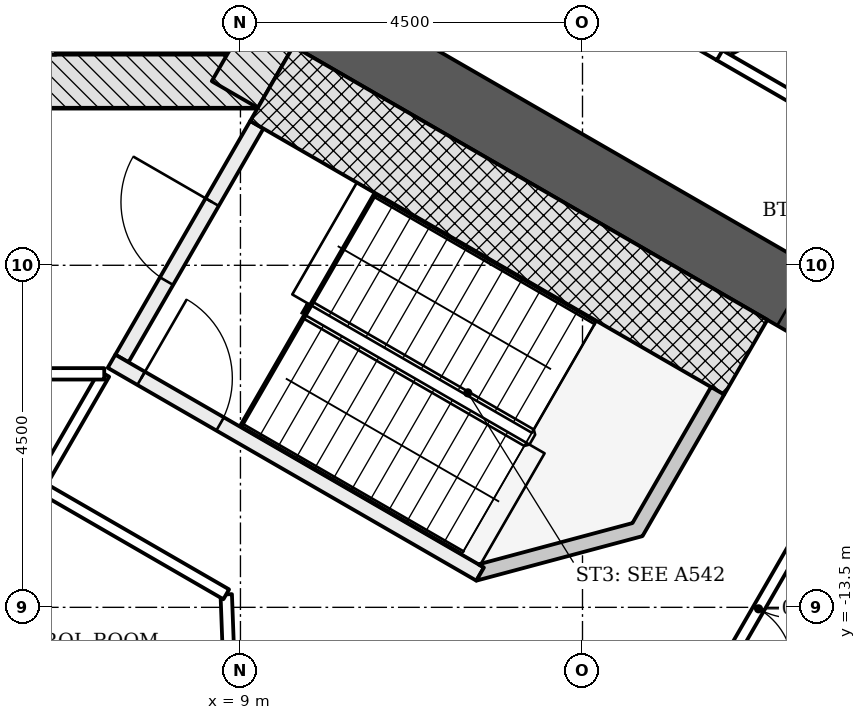
"""IFC4 building model, lengths in metres.
Left out: names, types, materials, properties, quantities, classifications, styles, units other than length and angle.
Written with IfcOpenShell. Run it as: python <this file> out.ifc"""

import sys

from ifc_helpers import new_model, si_unit, direction, frame, frame_2d, origin, place, context, subcontext, project, spatial, polyline, rectangle, outline, extrude, element, fill, save


model = new_model("IFC4")
c1 = context("Model", 3, precision=1e-05, world=origin(), true_north=direction((0.0, 1.0)))
c2 = subcontext(c1, "Body", "Model", "MODEL_VIEW")
j1 = project(units=[si_unit("LENGTHUNIT", "METRE"), si_unit("PLANEANGLEUNIT", "RADIAN")], contexts=[c1])
p1 = place(None, origin())
s1 = spatial("IfcSite", under=j1, at=p1, CompositionType="ELEMENT")
p2 = place(p1, origin())
s2 = spatial("IfcBuilding", under=s1, at=p2, CompositionType="ELEMENT")
p3 = place(p2, frame((0.0, 0.0, 6.0)))
s3 = spatial("IfcBuildingStorey", under=s2, at=p3, CompositionType="ELEMENT", Elevation=6.0)
p4 = place(p3, frame((-9.229, -6.578, -0.25), z_axis=(0.0, 0.0, 1.0), x_axis=(1.0, 0.0, 0.0)))
e1 = element("IfcWall", 1, at=p4, inside=s3, PredefinedType="SHEAR", context=c2, shape_type="SweptSolid", body=[
    extrude(rectangle(XDim=18.458, YDim=0.7, at=frame_2d((9.229, 0.0))), origin(), (0.0, 0.0, 1.0), 4.5),
])
p5 = place(p4, frame((3.304, 0.0, 0.25)))
e2 = element("IfcOpeningElement", 2, at=p5, cuts=e1, PredefinedType="OPENING", context=c2, shape_type="SweptSolid", body=[
    extrude(rectangle(XDim=1.1, YDim=2.1, at=frame_2d((0.55, 1.05))), frame((0.0, 0.36, 0.0), z_axis=(0.0, -1.0, 0.0), x_axis=(1.0, 0.0, 0.0)), (0.0, 0.0, 1.0), 0.72),
])
p6 = place(p4, frame((5.454, 0.0, 0.25)))
e3 = element("IfcOpeningElement", 3, at=p6, cuts=e1, PredefinedType="OPENING", context=c2, shape_type="SweptSolid", body=[
    extrude(rectangle(XDim=1.1, YDim=2.1, at=frame_2d((0.55, 1.05))), frame((0.0, 0.36, 0.0), z_axis=(0.0, -1.0, 0.0), x_axis=(1.0, 0.0, 0.0)), (0.0, 0.0, 1.0), 0.72),
])
p7 = place(p4, frame((7.604, 0.0, 0.25)))
e4 = element("IfcOpeningElement", 4, at=p7, cuts=e1, PredefinedType="OPENING", context=c2, shape_type="SweptSolid", body=[
    extrude(rectangle(XDim=1.1, YDim=2.1, at=frame_2d((0.55, 1.05))), frame((0.0, 0.36, 0.0), z_axis=(0.0, -1.0, 0.0), x_axis=(1.0, 0.0, 0.0)), (0.0, 0.0, 1.0), 0.72),
])
p8 = place(p4, frame((9.754, 0.0, 0.25)))
e5 = element("IfcOpeningElement", 5, at=p8, cuts=e1, PredefinedType="OPENING", context=c2, shape_type="SweptSolid", body=[
    extrude(rectangle(XDim=1.1, YDim=2.1, at=frame_2d((0.55, 1.05))), frame((0.0, 0.36, 0.0), z_axis=(0.0, -1.0, 0.0), x_axis=(1.0, 0.0, 0.0)), (0.0, 0.0, 1.0), 0.72),
])
p9 = place(p4, frame((11.904, 0.0, 0.25)))
e6 = element("IfcOpeningElement", 6, at=p9, cuts=e1, PredefinedType="OPENING", context=c2, shape_type="SweptSolid", body=[
    extrude(rectangle(XDim=1.1, YDim=2.1, at=frame_2d((0.55, 1.05))), frame((0.0, 0.36, 0.0), z_axis=(0.0, -1.0, 0.0), x_axis=(1.0, 0.0, 0.0)), (0.0, 0.0, 1.0), 0.72),
])
p10 = place(p4, frame((14.054, 0.0, 0.25)))
e7 = element("IfcOpeningElement", 7, at=p10, cuts=e1, PredefinedType="OPENING", context=c2, shape_type="SweptSolid", body=[
    extrude(rectangle(XDim=1.1, YDim=2.1, at=frame_2d((0.55, 1.05))), frame((0.0, 0.36, 0.0), z_axis=(0.0, -1.0, 0.0), x_axis=(1.0, 0.0, 0.0)), (0.0, 0.0, 1.0), 0.72),
])
p11 = place(p4, frame((1.079, 0.0, 0.25)))
e8 = element("IfcOpeningElement", 8, at=p11, cuts=e1, PredefinedType="OPENING", context=c2, shape_type="SweptSolid", body=[
    extrude(rectangle(XDim=0.9, YDim=2.1, at=frame_2d((0.45, 1.05))), frame((0.0, 0.36, 0.0), z_axis=(0.0, -1.0, 0.0), x_axis=(1.0, 0.0, 0.0)), (0.0, 0.0, 1.0), 0.72),
])
p12 = place(p3, frame((8.926, -6.753, -0.25), z_axis=(0.0, 0.0, 1.0), x_axis=(0.500042739161, 0.866000726912, 0.0)))
e9 = element("IfcWall", 9, at=p12, inside=s3, PredefinedType="SHEAR", context=c2, shape_type="SweptSolid", body=[
    extrude(rectangle(XDim=2.771, YDim=0.7, at=frame_2d((1.386, 0.0))), origin(), (0.0, 0.0, 1.0), 4.5),
])
p13 = place(p3, frame((9.922, -5.728, -0.25), z_axis=(0.0, 0.0, 1.0), x_axis=(0.866028046028, -0.499995423472, 0.0)))
e10 = element("IfcWall", 10, at=p13, inside=s3, PredefinedType="SHEAR", context=c2, shape_type="SweptSolid", body=[
    extrude(rectangle(XDim=14.633, YDim=0.9, at=frame_2d((7.316, 0.0))), origin(), (0.0, 0.0, 1.0), 4.5),
])
p14 = place(p13, frame((7.35, 0.0, 0.25)))
e11 = element("IfcOpeningElement", 11, at=p14, cuts=e10, PredefinedType="OPENING", context=c2, shape_type="SweptSolid", body=[
    extrude(rectangle(XDim=1.5, YDim=2.1, at=frame_2d((0.75, 1.05))), frame((0.0, 0.46, 0.0), z_axis=(0.0, -1.0, 0.0), x_axis=(1.0, 0.0, 0.0)), (0.0, 0.0, 1.0), 0.92),
])
p15 = place(p3, frame((6.45, -6.228, -0.25), z_axis=(0.0, 0.0, 1.0), x_axis=(0.0, 1.0, 0.0)))
e12 = element("IfcWall", 12, at=p15, inside=s3, PredefinedType="PARTITIONING", context=c2, shape_type="SweptSolid", body=[
    extrude(rectangle(XDim=2.5, YDim=0.25, at=frame_2d((1.25, 0.0))), origin(), (0.0, 0.0, 1.0), 4.5),
])
p16 = place(p3, frame((7.44, -10.226, -0.25), z_axis=(0.0, 0.0, 1.0), x_axis=(0.500022077904, 0.866012656725, 0.0)))
e13 = element("IfcWall", 13, at=p16, inside=s3, PredefinedType="SHEAR", context=c2, shape_type="SweptSolid", body=[
    extrude(rectangle(XDim=3.55, YDim=0.2, at=frame_2d((1.775, 0.0))), origin(), (0.0, 0.0, 1.0), 4.5),
])
p17 = place(p16, frame((1.175, 0.0, 0.25)))
e14 = element("IfcOpeningElement", 14, at=p17, cuts=e13, PredefinedType="OPENING", context=c2, shape_type="SweptSolid", body=[
    extrude(rectangle(XDim=1.2, YDim=2.1, at=frame_2d((0.6, 1.05))), frame((0.0, 0.11, 0.0), z_axis=(0.0, -1.0, 0.0), x_axis=(1.0, 0.0, 0.0)), (0.0, 0.0, 1.0), 0.22),
])
p18 = place(p3, frame((7.304, -10.262, -0.25), z_axis=(0.0, 0.0, 1.0), x_axis=(0.866026594901, -0.49999793692, 0.0)))
e15 = element("IfcWall", 15, at=p18, inside=s3, PredefinedType="SHEAR", context=c2, shape_type="SweptSolid", body=[
    extrude(rectangle(XDim=5.6, YDim=0.2, at=frame_2d((2.8, 0.0))), origin(), (0.0, 0.0, 1.0), 4.5),
])
p19 = place(p18, frame((0.45, 0.0, 0.25)))
e16 = element("IfcOpeningElement", 16, at=p19, cuts=e15, PredefinedType="OPENING", context=c2, shape_type="SweptSolid", body=[
    extrude(rectangle(XDim=1.2, YDim=2.1, at=frame_2d((0.6, 1.05))), frame((0.0, 0.11, 0.0), z_axis=(0.0, -1.0, 0.0), x_axis=(1.0, 0.0, 0.0)), (0.0, 0.0, 1.0), 0.22),
])
p20 = place(p3, frame((9.413, -6.61, -0.25), z_axis=(0.0, 0.0, 1.0), x_axis=(0.866018442252, -0.500012057535, 0.0)))
e17 = element("IfcWall", 17, at=p20, inside=s3, PredefinedType="SHEAR", context=c2, shape_type="SweptSolid", body=[
    extrude(rectangle(XDim=7.2, YDim=1.136, at=frame_2d((3.6, 0.0))), origin(), (0.0, 0.0, 1.0), 4.5),
])
p21 = place(p3, frame((0.0, 0.0, -0.25)))
e18 = element("IfcWall", 18, at=p21, inside=s3, PredefinedType="SHEAR", context=c2, shape_type="SweptSolid", body=[
    extrude(outline(polyline([(12.104, -13.149), (14.289, -12.563), (15.364, -10.701), (15.191, -10.601), (14.157, -12.392), (12.132, -12.934), (12.204, -12.976), (12.204, -12.976), (12.204, -12.976), (12.204, -12.976), (12.204, -12.976), (12.204, -12.976), (12.204, -12.976), (12.204, -12.976), (12.204, -12.976), (12.204, -12.976), (12.204, -12.976), (12.204, -12.976), (12.204, -12.976), (12.204, -12.976), (12.204, -12.976), (12.204, -12.976), (12.204, -12.976), (12.104, -13.149)])), origin(), (0.0, 0.0, 1.0), 4.5),
])
p22 = place(p3, frame((17.491, -10.618, 0.0), z_axis=(0.0, 0.0, 1.0), x_axis=(-0.499969057507, -0.866043267704, 0.0)))
e19 = element("IfcWall", 19, at=p22, inside=s3, PredefinedType="PARTITIONING", context=c2, shape_type="SweptSolid", body=[
    extrude(rectangle(XDim=6.685, YDim=0.15, at=frame_2d((3.342, 0.0))), origin(), (0.0, 0.0, 1.0), 3.638),
])
p23 = place(p22, frame((2.45, 0.0, 0.0)))
e20 = element("IfcOpeningElement", 20, at=p23, cuts=e19, PredefinedType="OPENING", context=c2, shape_type="SweptSolid", body=[
    extrude(rectangle(XDim=1.8, YDim=2.1, at=frame_2d((0.9, 1.05))), frame((0.0, 0.085, 0.0), z_axis=(0.0, -1.0, 0.0), x_axis=(1.0, 0.0, 0.0)), (0.0, 0.0, 1.0), 0.17),
])
p24 = place(p3, frame((8.865, -14.727, 0.0), z_axis=(0.0, 0.0, 1.0), x_axis=(-0.037173032443, 0.999308843981, 0.0)))
e21 = element("IfcWall", 21, at=p24, inside=s3, PredefinedType="PARTITIONING", context=c2, shape_type="SweptSolid", body=[
    extrude(rectangle(XDim=1.399, YDim=0.15, at=frame_2d((0.699, 0.0))), origin(), (0.0, 0.0, 1.0), 3.638),
])
p25 = place(p3, frame((8.813, -13.329, 0.0), z_axis=(0.0, 0.0, 1.0), x_axis=(-0.865804661524, 0.50038214205, 0.0)))
e22 = element("IfcWall", 22, at=p25, inside=s3, PredefinedType="PARTITIONING", context=c2, shape_type="SweptSolid", body=[
    extrude(rectangle(XDim=2.84, YDim=0.15, at=frame_2d((1.42, 0.0))), origin(), (0.0, 0.0, 1.0), 3.638),
])
p26 = place(p3, frame((6.354, -11.906, 0.0), z_axis=(0.0, 0.0, 1.0), x_axis=(0.500291894738, 0.865856812677, 0.0)))
e23 = element("IfcWall", 23, at=p26, inside=s3, PredefinedType="PARTITIONING", context=c2, shape_type="SweptSolid", body=[
    extrude(rectangle(XDim=1.707, YDim=0.15, at=frame_2d((0.854, 0.0))), origin(), (0.0, 0.0, 1.0), 4.25),
])
p27 = place(p3, frame((7.208, -10.428, 0.0), z_axis=(0.0, 0.0, 1.0), x_axis=(-1.0, 0.0, 0.0)))
e24 = element("IfcWall", 24, at=p27, inside=s3, PredefinedType="PARTITIONING", context=c2, shape_type="SweptSolid", body=[
    extrude(rectangle(XDim=2.861, YDim=0.15, at=frame_2d((1.431, 0.0))), origin(), (0.0, 0.0, 1.0), 3.638),
])
p28 = place(p27, frame((0.95, 0.0, 0.0)))
e25 = element("IfcOpeningElement", 25, at=p28, cuts=e24, PredefinedType="OPENING", context=c2, shape_type="SweptSolid", body=[
    extrude(rectangle(XDim=1.0, YDim=2.1, at=frame_2d((0.5, 1.05))), frame((0.0, 0.085, 0.0), z_axis=(0.0, -1.0, 0.0), x_axis=(1.0, 0.0, 0.0)), (0.0, 0.0, 1.0), 0.17),
])
p29 = place(p3, frame((19.942, -3.888, 0.0), z_axis=(0.0, 0.0, 1.0), x_axis=(-0.89239982182, -0.451245562877, 0.0)))
e26 = element("IfcWall", 26, at=p29, inside=s3, PredefinedType="PARTITIONING", context=c2, shape_type="SweptSolid", body=[
    extrude(rectangle(XDim=5.201, YDim=0.12, at=frame_2d((2.601, 0.0))), origin(), (0.0, 0.0, 1.0), 3.638),
])
p30 = place(p3, frame((15.295, -6.232, 0.0), z_axis=(0.0, 0.0, 1.0), x_axis=(0.865991915229, -0.500057999394, 0.0)))
e27 = element("IfcWall", 27, at=p30, inside=s3, PredefinedType="PARTITIONING", context=c2, shape_type="SweptSolid", body=[
    extrude(rectangle(XDim=4.094, YDim=0.15, at=frame_2d((2.047, 0.0))), origin(), (0.0, 0.0, 1.0), 3.638),
])
p31 = place(p30, frame((1.15, 0.0, 0.0)))
e28 = element("IfcOpeningElement", 28, at=p31, cuts=e27, PredefinedType="OPENING", context=c2, shape_type="SweptSolid", body=[
    extrude(rectangle(XDim=1.8, YDim=2.1, at=frame_2d((0.9, 1.05))), frame((0.0, 0.085, 0.0), z_axis=(0.0, -1.0, 0.0), x_axis=(1.0, 0.0, 0.0)), (0.0, 0.0, 1.0), 0.17),
])
p32 = place(p3, frame((14.078, -5.529, 0.0), z_axis=(0.0, 0.0, 1.0), x_axis=(0.865984561414, -0.500070734389, 0.0)))
e29 = element("IfcWall", 29, at=p32, inside=s3, PredefinedType="PARTITIONING", context=c2, shape_type="SweptSolid", body=[
    extrude(rectangle(XDim=1.416, YDim=0.15, at=frame_2d((0.708, 0.0))), origin(), (0.0, 0.0, 1.0), 3.638),
])
p33 = place(p17, origin())
e30 = element("IfcDoor", 30, at=p33, inside=s3, OperationType="SINGLE_SWING_RIGHT", PredefinedType="DOOR", context=c2, shape_type="SweptSolid", body=[
    extrude(rectangle(XDim=1.2, YDim=2.1, at=frame_2d((0.6, 1.05))), frame((0.0, 0.025, 0.0), z_axis=(0.0, -1.0, 0.0), x_axis=(1.0, 0.0, 0.0)), (0.0, 0.0, 1.0), 0.05),
])
fill(e14, e30)
p34 = place(p19, origin())
e31 = element("IfcDoor", 31, at=p34, inside=s3, OperationType="SINGLE_SWING_LEFT", PredefinedType="DOOR", context=c2, shape_type="SweptSolid", body=[
    extrude(rectangle(XDim=1.2, YDim=2.1, at=frame_2d((0.6, 1.05))), frame((0.0, 0.025, 0.0), z_axis=(0.0, -1.0, 0.0), x_axis=(1.0, 0.0, 0.0)), (0.0, 0.0, 1.0), 0.05),
])
fill(e16, e31)
p35 = place(p23, origin())
e32 = element("IfcDoor", 32, at=p35, inside=s3, OperationType="DOUBLE_DOOR_SINGLE_SWING", PredefinedType="DOOR", context=c2, shape_type="SweptSolid", body=[
    extrude(rectangle(XDim=1.8, YDim=2.1, at=frame_2d((0.9, 1.05))), frame((0.0, 0.025, 0.0), z_axis=(0.0, -1.0, 0.0), x_axis=(1.0, 0.0, 0.0)), (0.0, 0.0, 1.0), 0.05),
])
fill(e20, e32)
save(model, sys.argv[1])
